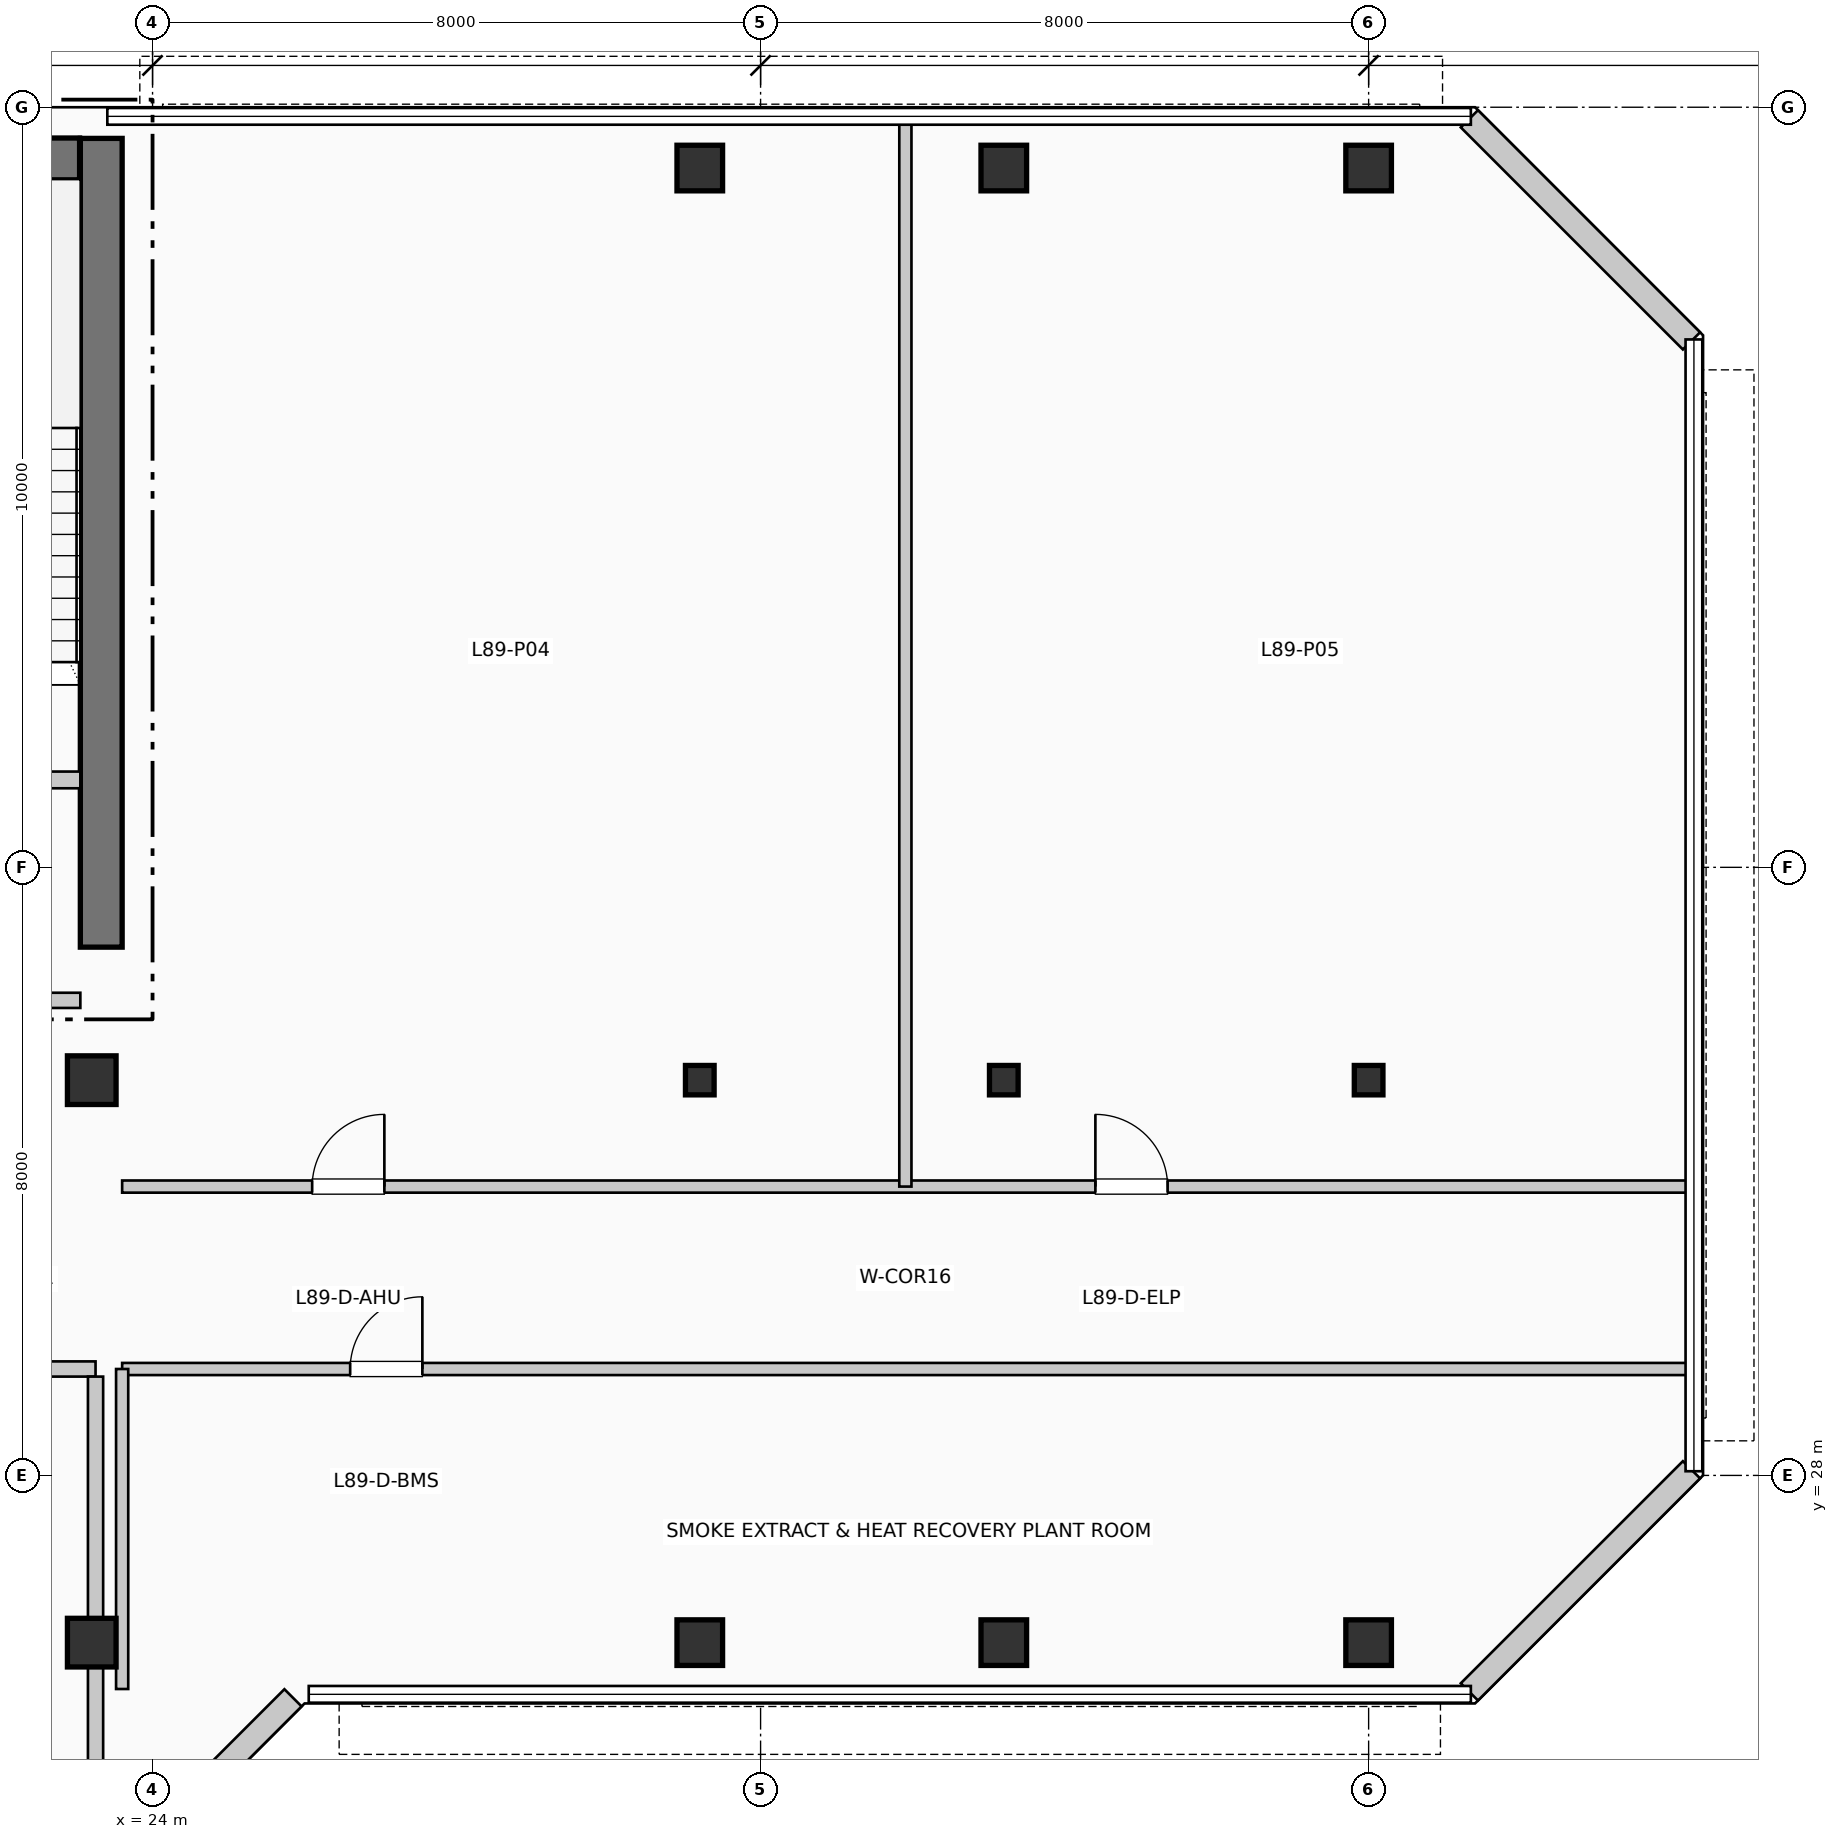
"""IFC4 building model, lengths in metres.
Left out: names, types, materials, properties, quantities, classifications, styles, units other than length and angle.
Written with IfcOpenShell. Run it as: python <this file> out.ifc"""

import sys

from ifc_helpers import new_model, si_unit, direction, frame, frame_2d, origin, origin_2d, place, context, subcontext, project, spatial, rectangle, i_section, extrude, element, fill, save


model = new_model("IFC4")
c1 = context("Model", 3, precision=1e-05, world=origin(), true_north=direction((0.0, 1.0)))
c2 = subcontext(c1, "Body", "Model", "MODEL_VIEW")
j1 = project(units=[si_unit("LENGTHUNIT", "METRE"), si_unit("PLANEANGLEUNIT", "RADIAN")], contexts=[c1])
p1 = place(None, origin())
s1 = spatial("IfcSite", under=j1, at=p1, CompositionType="ELEMENT")
p2 = place(p1, origin())
s2 = spatial("IfcBuilding", under=s1, at=p2, CompositionType="ELEMENT")
p3 = place(p2, frame((0.0, 0.0, 365.97)))
s3 = spatial("IfcBuildingStorey", under=s2, at=p3, CompositionType="ELEMENT", Elevation=365.97)
p4 = place(p3, frame((23.325, 34.95, 0.0), z_axis=(0.0, 0.0, 1.0), x_axis=(0.0, 1.0, 0.0)))
e1 = element("IfcWall", 1, at=p4, inside=s3, PredefinedType="SHEAR", context=c2, shape_type="SweptSolid", body=[
    extrude(rectangle(XDim=10.64, YDim=0.55, at=frame_2d((5.32, 0.0))), origin(), (0.0, 0.0, 1.0), 3.96),
])
p5 = place(p3, frame((19.35, 45.32, 0.0), z_axis=(0.0, 0.0, 1.0), x_axis=(1.0, 0.0, 0.0)))
e2 = element("IfcWall", 2, at=p5, inside=s3, PredefinedType="SHEAR", context=c2, shape_type="SweptSolid", body=[
    extrude(rectangle(XDim=3.69, YDim=0.55, at=frame_2d((1.845, 0.0))), origin(), (0.0, 0.0, 1.0), 3.96),
])
p6 = place(p5, frame((1.15, 0.0, 1.05)))
e3 = element("IfcOpeningElement", 3, at=p6, cuts=e2, PredefinedType="OPENING", context=c2, shape_type="SweptSolid", body=[
    extrude(rectangle(XDim=1.4, YDim=1.8, at=frame_2d((0.7, 0.9))), frame((0.0, 0.285, 0.0), z_axis=(0.0, -1.0, 0.0), x_axis=(1.0, 0.0, 0.0)), (0.0, 0.0, 1.0), 0.57),
])
for number, where, z_axis, x_axis in (
    (4, (23.2, 25.8, 0.0), (0.0, 0.0, 1.0), (1.0, 0.0, 0.0)),
    (5, (23.2, 33.2, 0.0), (0.0, 0.0, 1.0), (1.0, 0.0, 0.0)),
):
    element("IfcColumn", number, at=place(p3, frame(where, z_axis=z_axis, x_axis=x_axis)), inside=s3, PredefinedType="COLUMN", context=c2, shape_type="SweptSolid", body=[
        extrude(rectangle(XDim=0.64, YDim=0.64, at=origin_2d()), origin(), (0.0, 0.0, 1.0), 3.96),
    ])
p7 = place(p3, frame((31.2, 25.8, 0.0), z_axis=(0.0, 0.0, 1.0), x_axis=(1.0, 0.0, 0.0)))
e6 = element("IfcColumn", 6, at=p7, inside=s3, PredefinedType="COLUMN", context=c2, shape_type="SweptSolid", body=[
    extrude(rectangle(XDim=0.6, YDim=0.6, at=origin_2d()), origin(), (0.0, 0.0, 1.0), 3.96),
])
p8 = place(p3, frame((31.2, 33.2, 0.0), z_axis=(0.0, 0.0, 1.0), x_axis=(1.0, 0.0, 0.0)))
e7 = element("IfcColumn", 7, at=p8, inside=s3, PredefinedType="COLUMN", context=c2, shape_type="SweptSolid", body=[
    extrude(i_section(OverallWidth=0.377, OverallDepth=0.387, WebThickness=0.016, FlangeThickness=0.027, at=origin_2d()), origin(), (0.0, 0.0, 1.0), 3.96),
])
for number, where, z_axis, x_axis in (
    (8, (31.2, 45.2, 0.0), (0.0, 0.0, 1.0), (1.0, 0.0, 0.0)),
    (9, (35.2, 25.8, 0.0), (0.0, 0.0, 1.0), (1.0, 0.0, 0.0)),
):
    element("IfcColumn", number, at=place(p3, frame(where, z_axis=z_axis, x_axis=x_axis)), inside=s3, PredefinedType="COLUMN", context=c2, shape_type="SweptSolid", body=[
        extrude(rectangle(XDim=0.6, YDim=0.6, at=origin_2d()), origin(), (0.0, 0.0, 1.0), 3.96),
    ])
p9 = place(p3, frame((35.2, 33.2, 0.0), z_axis=(0.0, 0.0, 1.0), x_axis=(1.0, 0.0, 0.0)))
e10 = element("IfcColumn", 10, at=p9, inside=s3, PredefinedType="COLUMN", context=c2, shape_type="SweptSolid", body=[
    extrude(i_section(OverallWidth=0.377, OverallDepth=0.387, WebThickness=0.016, FlangeThickness=0.027, at=origin_2d()), origin(), (0.0, 0.0, 1.0), 3.96),
])
for number, where, z_axis, x_axis in (
    (11, (35.2, 45.2, 0.0), (0.0, 0.0, 1.0), (1.0, 0.0, 0.0)),
    (12, (40.0, 25.8, 0.0), (0.0, 0.0, 1.0), (1.0, 0.0, 0.0)),
):
    element("IfcColumn", number, at=place(p3, frame(where, z_axis=z_axis, x_axis=x_axis)), inside=s3, PredefinedType="COLUMN", context=c2, shape_type="SweptSolid", body=[
        extrude(rectangle(XDim=0.6, YDim=0.6, at=origin_2d()), origin(), (0.0, 0.0, 1.0), 3.96),
    ])
p10 = place(p3, frame((40.0, 33.2, 0.0), z_axis=(0.0, 0.0, 1.0), x_axis=(1.0, 0.0, 0.0)))
e13 = element("IfcColumn", 13, at=p10, inside=s3, PredefinedType="COLUMN", context=c2, shape_type="SweptSolid", body=[
    extrude(i_section(OverallWidth=0.377, OverallDepth=0.387, WebThickness=0.016, FlangeThickness=0.027, at=origin_2d()), origin(), (0.0, 0.0, 1.0), 3.96),
])
p11 = place(p3, frame((40.0, 45.2, 0.0), z_axis=(0.0, 0.0, 1.0), x_axis=(1.0, 0.0, 0.0)))
e14 = element("IfcColumn", 14, at=p11, inside=s3, PredefinedType="COLUMN", context=c2, shape_type="SweptSolid", body=[
    extrude(rectangle(XDim=0.6, YDim=0.6, at=origin_2d()), origin(), (0.0, 0.0, 1.0), 3.96),
])
p12 = place(p3, frame((23.926, 23.152, 0.0), z_axis=(0.0, 0.0, 1.0), x_axis=(0.707106781187, 0.707106781187, 0.0)))
e15 = element("IfcWall", 15, at=p12, inside=s3, PredefinedType="SOLIDWALL", context=c2, shape_type="SweptSolid", body=[
    extrude(rectangle(XDim=2.718, YDim=0.32, at=frame_2d((1.359, 0.0))), origin(), (0.0, 0.0, 1.0), 3.61),
])
for number, where, z_axis, x_axis in (
    (16, (41.326, 25.152, 0.0), (0.0, 0.0, 1.0), (0.707, 0.707, 0.0)),
    (17, (44.248, 42.926, 0.0), (0.0, 0.0, 1.0), (-0.707, 0.707, 0.0)),
):
    element("IfcWall", number, at=place(p3, frame(where, z_axis=z_axis, x_axis=x_axis)), inside=s3, PredefinedType="SOLIDWALL", context=c2, shape_type="SweptSolid", body=[
        extrude(rectangle(XDim=4.133, YDim=0.32, at=frame_2d((2.066, 0.0))), origin(), (0.0, 0.0, 1.0), 3.61),
    ])
p13 = place(p3, frame((19.9, 37.15, 0.0), z_axis=(0.0, 0.0, 1.0), x_axis=(1.0, 0.0, 0.0)))
e18 = element("IfcWall", 18, at=p13, inside=s3, PredefinedType="PARTITIONING", context=c2, shape_type="SweptSolid", body=[
    extrude(rectangle(XDim=3.15, YDim=0.22, at=frame_2d((1.575, 0.0))), origin(), (0.0, 0.0, 1.0), 3.61),
])
p14 = place(p13, frame((2.05, 0.0, 0.0), z_axis=(0.0, 0.0, 1.0), x_axis=(-1.0, 0.0, 0.0)))
e19 = element("IfcOpeningElement", 19, at=p14, cuts=e18, PredefinedType="OPENING", context=c2, shape_type="SweptSolid", body=[
    extrude(rectangle(XDim=1.05, YDim=2.15, at=frame_2d((0.525, 1.075))), frame((0.0, 0.12, 0.0), z_axis=(0.0, -1.0, 0.0), x_axis=(1.0, 0.0, 0.0)), (0.0, 0.0, 1.0), 0.24),
])
p15 = place(p3, frame((19.8, 34.25, 0.0), z_axis=(0.0, 0.0, 1.0), x_axis=(1.0, 0.0, 0.0)))
e20 = element("IfcWall", 20, at=p15, inside=s3, PredefinedType="PARTITIONING", context=c2, shape_type="SweptSolid", body=[
    extrude(rectangle(XDim=3.25, YDim=0.2, at=frame_2d((1.625, 0.0))), origin(), (0.0, 0.0, 1.0), 3.61),
])
p16 = place(p15, frame((2.15, 0.0, 0.0), z_axis=(0.0, 0.0, 1.0), x_axis=(-1.0, 0.0, 0.0)))
e21 = element("IfcOpeningElement", 21, at=p16, cuts=e20, PredefinedType="OPENING", context=c2, shape_type="SweptSolid", body=[
    extrude(rectangle(XDim=1.1, YDim=2.15, at=frame_2d((0.55, 1.075))), frame((0.0, 0.11, 0.0), z_axis=(0.0, -1.0, 0.0), x_axis=(1.0, 0.0, 0.0)), (0.0, 0.0, 1.0), 0.22),
])
p17 = place(p3, frame((0.19, 29.4, 0.0), z_axis=(0.0, 0.0, 1.0), x_axis=(1.0, 0.0, 0.0)))
e22 = element("IfcWall", 22, at=p17, inside=s3, PredefinedType="PARTITIONING", context=c2, shape_type="SweptSolid", body=[
    extrude(rectangle(XDim=23.06, YDim=0.2, at=frame_2d((11.53, 0.0))), origin(), (0.0, 0.0, 1.0), 3.295),
])
p18 = place(p17, frame((3.8, 0.0, 0.0)))
e23 = element("IfcOpeningElement", 23, at=p18, cuts=e22, PredefinedType="OPENING", context=c2, shape_type="SweptSolid", body=[
    extrude(rectangle(XDim=1.1, YDim=2.15, at=frame_2d((0.55, 1.075))), frame((0.0, 0.11, 0.0), z_axis=(0.0, -1.0, 0.0), x_axis=(1.0, 0.0, 0.0)), (0.0, 0.0, 1.0), 0.22),
])
p19 = place(p17, frame((14.5, 0.0, 0.0)))
e24 = element("IfcOpeningElement", 24, at=p19, cuts=e22, PredefinedType="OPENING", context=c2, shape_type="SweptSolid", body=[
    extrude(rectangle(XDim=1.1, YDim=2.15, at=frame_2d((0.55, 1.075))), frame((0.0, 0.11, 0.0), z_axis=(0.0, -1.0, 0.0), x_axis=(1.0, 0.0, 0.0)), (0.0, 0.0, 1.0), 0.22),
])
p20 = place(p3, frame((23.25, 11.79, 0.0), z_axis=(0.0, 0.0, 1.0), x_axis=(0.0, 1.0, 0.0)))
e25 = element("IfcWall", 25, at=p20, inside=s3, PredefinedType="PARTITIONING", context=c2, shape_type="SweptSolid", body=[
    extrude(rectangle(XDim=17.51, YDim=0.2, at=frame_2d((8.755, 0.0))), origin(), (0.0, 0.0, 1.0), 3.095),
])
p21 = place(p3, frame((23.6, 31.8, 0.0), z_axis=(0.0, 0.0, 1.0), x_axis=(1.0, 0.0, 0.0)))
e26 = element("IfcWall", 26, at=p21, inside=s3, PredefinedType="PARTITIONING", context=c2, shape_type="SweptSolid", body=[
    extrude(rectangle(XDim=20.61, YDim=0.16, at=frame_2d((10.305, 0.0))), origin(), (0.0, 0.0, 1.0), 3.61),
])
p22 = place(p21, frame((2.5, 0.0, 0.0)))
e27 = element("IfcOpeningElement", 27, at=p22, cuts=e26, PredefinedType="OPENING", context=c2, shape_type="SweptSolid", body=[
    extrude(rectangle(XDim=0.95, YDim=2.1, at=frame_2d((0.475, 1.05))), frame((0.0, 0.09, 0.0), z_axis=(0.0, -1.0, 0.0), x_axis=(1.0, 0.0, 0.0)), (0.0, 0.0, 1.0), 0.18),
])
p23 = place(p21, frame((12.805, 0.0, 0.0)))
e28 = element("IfcOpeningElement", 28, at=p23, cuts=e26, PredefinedType="OPENING", context=c2, shape_type="SweptSolid", body=[
    extrude(rectangle(XDim=0.95, YDim=2.1, at=frame_2d((0.475, 1.05))), frame((0.0, 0.09, 0.0), z_axis=(0.0, -1.0, 0.0), x_axis=(1.0, 0.0, 0.0)), (0.0, 0.0, 1.0), 0.18),
])
p24 = place(p3, frame((33.905, 31.8, 0.0), z_axis=(0.0, 0.0, 1.0), x_axis=(0.0, 1.0, 0.0)))
e29 = element("IfcWall", 29, at=p24, inside=s3, PredefinedType="PARTITIONING", context=c2, shape_type="SweptSolid", body=[
    extrude(rectangle(XDim=14.01, YDim=0.16, at=frame_2d((7.005, 0.0))), origin(), (0.0, 0.0, 1.0), 3.61),
])
p25 = place(p3, frame((23.6, 29.4, 0.0), z_axis=(0.0, 0.0, 1.0), x_axis=(1.0, 0.0, 0.0)))
e30 = element("IfcWall", 30, at=p25, inside=s3, PredefinedType="PARTITIONING", context=c2, shape_type="SweptSolid", body=[
    extrude(rectangle(XDim=20.61, YDim=0.16, at=frame_2d((10.305, 0.0))), origin(), (0.0, 0.0, 1.0), 3.295),
])
p26 = place(p25, frame((3.0, 0.0, 0.0)))
e31 = element("IfcOpeningElement", 31, at=p26, cuts=e30, PredefinedType="OPENING", context=c2, shape_type="SweptSolid", body=[
    extrude(rectangle(XDim=0.95, YDim=2.1, at=frame_2d((0.475, 1.05))), frame((0.0, 0.09, 0.0), z_axis=(0.0, -1.0, 0.0), x_axis=(1.0, 0.0, 0.0)), (0.0, 0.0, 1.0), 0.18),
])
p27 = place(p3, frame((23.6, 25.19, 0.0), z_axis=(0.0, 0.0, 1.0), x_axis=(0.0, 1.0, 0.0)))
e32 = element("IfcWall", 32, at=p27, inside=s3, PredefinedType="PARTITIONING", context=c2, shape_type="SweptSolid", body=[
    extrude(rectangle(XDim=4.21, YDim=0.16, at=frame_2d((2.105, 0.0))), origin(), (0.0, 0.0, 1.0), 3.095),
])
p28 = place(p22, origin())
e33 = element("IfcDoor", 33, at=p28, inside=s3, OperationType="SINGLE_SWING_RIGHT", PredefinedType="DOOR", context=c2, shape_type="SweptSolid", body=[
    extrude(rectangle(XDim=0.95, YDim=2.1, at=frame_2d((0.475, 1.05))), frame((0.0, 0.025, 0.0), z_axis=(0.0, -1.0, 0.0), x_axis=(1.0, 0.0, 0.0)), (0.0, 0.0, 1.0), 0.05),
])
fill(e27, e33)
p29 = place(p23, origin())
e34 = element("IfcDoor", 34, at=p29, inside=s3, OperationType="SINGLE_SWING_LEFT", PredefinedType="DOOR", context=c2, shape_type="SweptSolid", body=[
    extrude(rectangle(XDim=0.95, YDim=2.1, at=frame_2d((0.475, 1.05))), frame((0.0, 0.025, 0.0), z_axis=(0.0, -1.0, 0.0), x_axis=(1.0, 0.0, 0.0)), (0.0, 0.0, 1.0), 0.05),
])
fill(e28, e34)
p30 = place(p26, origin())
e35 = element("IfcDoor", 35, at=p30, inside=s3, OperationType="SINGLE_SWING_RIGHT", PredefinedType="DOOR", context=c2, shape_type="SweptSolid", body=[
    extrude(rectangle(XDim=0.95, YDim=2.1, at=frame_2d((0.475, 1.05))), frame((0.0, 0.025, 0.0), z_axis=(0.0, -1.0, 0.0), x_axis=(1.0, 0.0, 0.0)), (0.0, 0.0, 1.0), 0.05),
])
fill(e31, e35)
save(model, sys.argv[1])
